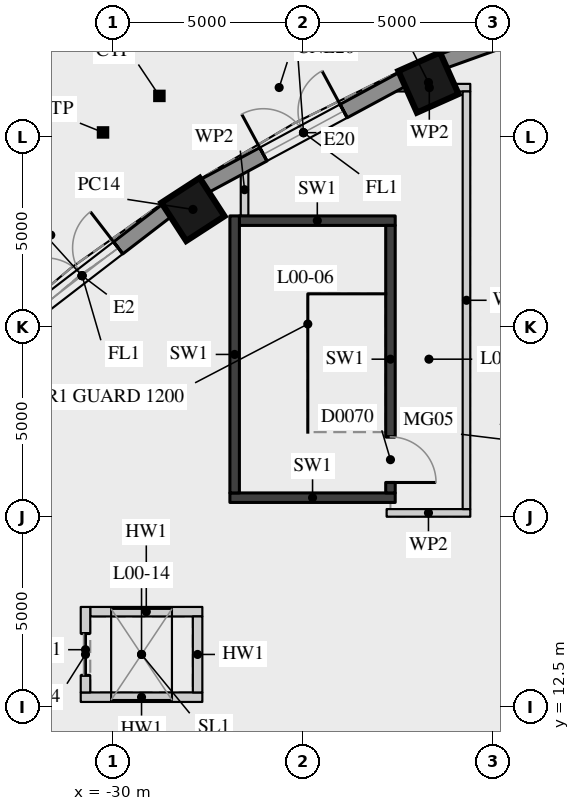
"""IFC4 building model, lengths in metres.
Left out: names, types, materials, properties, quantities, classifications, styles, units other than length and angle.
Written with IfcOpenShell. Run it as: python <this file> out.ifc"""

import sys

from ifc_helpers import new_model, si_unit, direction, frame, frame_2d, origin, origin_2d, place, context, subcontext, project, spatial, rectangle, hollow_circle, extrude, element, fill, save


model = new_model("IFC4")
c1 = context("Model", 3, precision=1e-05, world=origin(), true_north=direction((0.0, 1.0)))
c2 = subcontext(c1, "Body", "Model", "MODEL_VIEW")
j1 = project(units=[si_unit("LENGTHUNIT", "METRE"), si_unit("PLANEANGLEUNIT", "RADIAN")], contexts=[c1])
p1 = place(None, origin())
s1 = spatial("IfcSite", under=j1, at=p1, CompositionType="ELEMENT")
p2 = place(p1, origin())
s2 = spatial("IfcBuilding", under=s1, at=p2, CompositionType="ELEMENT")
p3 = place(p2, origin())
s3 = spatial("IfcBuildingStorey", under=s2, at=p3, CompositionType="ELEMENT", Elevation=0.0)
for number, where, z_axis, x_axis in (
    (1, (-21.7, 28.925, 0.0), (0.0, 0.0, 1.0), (-0.407, 0.913, 0.0)),
    (2, (-27.897, 25.586, 0.0), (0.0, 0.0, 1.0), (-0.544, 0.839, 0.0)),
):
    element("IfcColumn", number, at=place(p3, frame(where, z_axis=z_axis, x_axis=x_axis)), inside=s3, PredefinedType="COLUMN", context=c2, shape_type="SweptSolid", body=[
        extrude(rectangle(XDim=1.2, YDim=1.2, at=origin_2d()), origin(), (0.0, 0.0, 1.0), 7.5),
    ])
p4 = place(p3, frame((-15.49, 31.577, 0.0), z_axis=(0.0, 0.0, 1.0), x_axis=(-0.941225814421, -0.337777983694, 0.0)))
e3 = element("IfcWall", 3, at=p4, inside=s3, PredefinedType="SOLIDWALL", context=c2, shape_type="SweptSolid", body=[
    extrude(rectangle(XDim=6.199, YDim=0.4, at=frame_2d((3.1, 0.0))), origin(), (0.0, 0.0, 1.0), 6.19),
])
p5 = place(p4, frame((1.9, 0.0, 0.0)))
e4 = element("IfcOpeningElement", 4, at=p5, cuts=e3, PredefinedType="OPENING", context=c2, shape_type="SweptSolid", body=[
    extrude(rectangle(XDim=2.4, YDim=2.2, at=frame_2d((1.2, 1.1))), frame((0.0, 0.21, 0.0), z_axis=(0.0, -1.0, 0.0), x_axis=(1.0, 0.0, 0.0)), (0.0, 0.0, 1.0), 0.42),
])
p6 = place(p4, frame((1.9, 0.0, 2.6)))
e5 = element("IfcOpeningElement", 5, at=p6, cuts=e3, PredefinedType="OPENING", context=c2, shape_type="SweptSolid", body=[
    extrude(rectangle(XDim=2.4, YDim=3.49, at=frame_2d((1.2, 1.745))), frame((0.0, 0.21, 0.0), z_axis=(0.0, -1.0, 0.0), x_axis=(1.0, 0.0, 0.0)), (0.0, 0.0, 1.0), 0.42),
])
p7 = place(p3, frame((-22.366, 29.019, 0.0), z_axis=(0.0, 0.0, 1.0), x_axis=(-0.880313157301, -0.474393028072, 0.0)))
e6 = element("IfcWall", 6, at=p7, inside=s3, PredefinedType="SOLIDWALL", context=c2, shape_type="SweptSolid", body=[
    extrude(rectangle(XDim=5.958, YDim=0.4, at=frame_2d((2.979, 0.0))), origin(), (0.0, 0.0, 1.0), 6.19),
])
p8 = place(p7, frame((1.779, 0.0, 0.0)))
e7 = element("IfcOpeningElement", 7, at=p8, cuts=e6, PredefinedType="OPENING", context=c2, shape_type="SweptSolid", body=[
    extrude(rectangle(XDim=2.4, YDim=2.2, at=frame_2d((1.2, 1.1))), frame((0.0, 0.21, 0.0), z_axis=(0.0, -1.0, 0.0), x_axis=(1.0, 0.0, 0.0)), (0.0, 0.0, 1.0), 0.42),
])
p9 = place(p7, frame((1.779, 0.0, 2.6)))
e8 = element("IfcOpeningElement", 8, at=p9, cuts=e6, PredefinedType="OPENING", context=c2, shape_type="SweptSolid", body=[
    extrude(rectangle(XDim=2.4, YDim=3.49, at=frame_2d((1.2, 1.745))), frame((0.0, 0.21, 0.0), z_axis=(0.0, -1.0, 0.0), x_axis=(1.0, 0.0, 0.0)), (0.0, 0.0, 1.0), 0.42),
])
p10 = place(p3, frame((-28.781, 28.573, -0.2), z_axis=(0.0, 0.0, 1.0), x_axis=(1.0, 0.0, 0.0)))
e9 = element("IfcColumn", 9, at=p10, inside=s3, PredefinedType="COLUMN", context=c2, shape_type="SweptSolid", body=[
    extrude(hollow_circle(Radius=0.084, WallThickness=0.008, at=origin_2d()), origin(), (0.0, 0.0, 1.0), 4.755),
])
p11 = place(p3, frame((-28.567, 25.572, 0.0), z_axis=(0.0, 0.0, 1.0), x_axis=(-0.79246558555, -0.609916630138, 0.0)))
e10 = element("IfcWall", 10, at=p11, inside=s3, PredefinedType="SOLIDWALL", context=c2, shape_type="SweptSolid", body=[
    extrude(rectangle(XDim=5.673, YDim=0.4, at=frame_2d((2.837, 0.0))), origin(), (0.0, 0.0, 1.0), 6.19),
])
p12 = place(p11, frame((1.637, 0.0, 0.0)))
e11 = element("IfcOpeningElement", 11, at=p12, cuts=e10, PredefinedType="OPENING", context=c2, shape_type="SweptSolid", body=[
    extrude(rectangle(XDim=2.4, YDim=2.2, at=frame_2d((1.2, 1.1))), frame((0.0, 0.21, 0.0), z_axis=(0.0, -1.0, 0.0), x_axis=(1.0, 0.0, 0.0)), (0.0, 0.0, 1.0), 0.42),
])
p13 = place(p11, frame((1.637, 0.0, 2.6)))
e12 = element("IfcOpeningElement", 12, at=p13, cuts=e10, PredefinedType="OPENING", context=c2, shape_type="SweptSolid", body=[
    extrude(rectangle(XDim=2.4, YDim=3.49, at=frame_2d((1.2, 1.745))), frame((0.0, 0.21, 0.0), z_axis=(0.0, -1.0, 0.0), x_axis=(1.0, 0.0, 0.0)), (0.0, 0.0, 1.0), 0.42),
])
p14 = place(p3, frame((-30.264, 27.612, -0.2), z_axis=(0.0, 0.0, 1.0), x_axis=(1.0, 0.0, 0.0)))
e13 = element("IfcColumn", 13, at=p14, inside=s3, PredefinedType="COLUMN", context=c2, shape_type="SweptSolid", body=[
    extrude(hollow_circle(Radius=0.084, WallThickness=0.008, at=origin_2d()), origin(), (0.0, 0.0, 1.0), 4.755),
])
p15 = place(p3, frame((-30.85, 12.75, 0.0), z_axis=(0.0, 0.0, 1.0), x_axis=(1.0, 0.0, 0.0)))
e14 = element("IfcWall", 14, at=p15, inside=s3, PredefinedType="SHEAR", context=c2, shape_type="SweptSolid", body=[
    extrude(rectangle(XDim=3.2, YDim=0.25, at=frame_2d((1.6, 0.0))), origin(), (0.0, 0.0, 1.0), 7.09),
])
p16 = place(p3, frame((-30.6, 15.0, 0.0), z_axis=(0.0, 0.0, 1.0), x_axis=(1.0, 0.0, 0.0)))
e15 = element("IfcWall", 15, at=p16, inside=s3, PredefinedType="SHEAR", context=c2, shape_type="SweptSolid", body=[
    extrude(rectangle(XDim=2.95, YDim=0.25, at=frame_2d((1.475, 0.0))), origin(), (0.0, 0.0, 1.0), 7.09),
])
p17 = place(p3, frame((-22.8, 17.6, 0.0), z_axis=(0.0, 0.0, 1.0), x_axis=(1.0, 0.0, 0.0)))
e16 = element("IfcWall", 16, at=p17, inside=s3, PredefinedType="PARTITIONING", context=c2, shape_type="SweptSolid", body=[
    extrude(rectangle(XDim=2.2, YDim=0.2, at=frame_2d((1.1, 0.0))), origin(), (0.0, 0.0, 1.0), 7.09),
])
p18 = place(p3, frame((-26.925, 18.0, 0.0), z_axis=(0.0, 0.0, 1.0), x_axis=(1.0, 0.0, 0.0)))
e17 = element("IfcWall", 17, at=p18, inside=s3, PredefinedType="SOLIDWALL", context=c2, shape_type="SweptSolid", body=[
    extrude(rectangle(XDim=4.35, YDim=0.25, at=frame_2d((2.175, 0.0))), origin(), (0.0, 0.0, 1.0), 7.09),
])
p19 = place(p3, frame((-26.675, 25.29, 0.0), z_axis=(0.0, 0.0, 1.0), x_axis=(1.0, 0.0, 0.0)))
e18 = element("IfcWall", 18, at=p19, inside=s3, PredefinedType="SOLIDWALL", context=c2, shape_type="SweptSolid", body=[
    extrude(rectangle(XDim=4.1, YDim=0.25, at=frame_2d((2.05, 0.0))), origin(), (0.0, 0.0, 1.0), 7.09),
])
p20 = place(p3, frame((-22.755, 28.79, 0.0), z_axis=(0.0, 0.0, 1.0), x_axis=(1.0, 0.0, 0.0)))
e19 = element("IfcWall", 19, at=p20, inside=s3, PredefinedType="PARTITIONING", context=c2, shape_type="SweptSolid", body=[
    extrude(rectangle(XDim=2.155, YDim=0.2, at=frame_2d((1.078, 0.0))), origin(), (0.0, 0.0, 1.0), 7.09),
])
p21 = place(p3, frame((-30.725, 12.875, 0.0), z_axis=(0.0, 0.0, 1.0), x_axis=(0.0, 1.0, 0.0)))
e20 = element("IfcWall", 20, at=p21, inside=s3, PredefinedType="SHEAR", context=c2, shape_type="SweptSolid", body=[
    extrude(rectangle(XDim=2.25, YDim=0.25, at=frame_2d((1.125, 0.0))), origin(), (0.0, 0.0, 1.0), 7.09),
])
p22 = place(p21, frame((0.45, 0.0, 0.0)))
e21 = element("IfcOpeningElement", 21, at=p22, cuts=e20, PredefinedType="OPENING", context=c2, shape_type="SweptSolid", body=[
    extrude(rectangle(XDim=1.1, YDim=2.1, at=frame_2d((0.55, 1.05))), frame((0.0, 0.135, 0.0), z_axis=(0.0, -1.0, 0.0), x_axis=(1.0, 0.0, 0.0)), (0.0, 0.0, 1.0), 0.27),
])
p23 = place(p3, frame((-27.775, 12.875, 0.0), z_axis=(0.0, 0.0, 1.0), x_axis=(0.0, 1.0, 0.0)))
e22 = element("IfcWall", 22, at=p23, inside=s3, PredefinedType="SHEAR", context=c2, shape_type="SweptSolid", body=[
    extrude(rectangle(XDim=2.0, YDim=0.25, at=frame_2d((1.0, 0.0))), origin(), (0.0, 0.0, 1.0), 7.09),
])
p24 = place(p3, frame((-26.8, 18.125, 0.0), z_axis=(0.0, 0.0, 1.0), x_axis=(0.0, 1.0, 0.0)))
e23 = element("IfcWall", 23, at=p24, inside=s3, PredefinedType="SOLIDWALL", context=c2, shape_type="SweptSolid", body=[
    extrude(rectangle(XDim=7.29, YDim=0.25, at=frame_2d((3.645, 0.0))), origin(), (0.0, 0.0, 1.0), 7.09),
])
p25 = place(p3, frame((-26.539, 25.415, 0.0), z_axis=(0.0, 0.0, 1.0), x_axis=(0.0, 1.0, 0.0)))
e24 = element("IfcWall", 24, at=p25, inside=s3, PredefinedType="PARTITIONING", context=c2, shape_type="SweptSolid", body=[
    extrude(rectangle(XDim=1.381, YDim=0.2, at=frame_2d((0.69, 0.0))), origin(), (0.0, 0.0, 1.0), 7.09),
])
p26 = place(p3, frame((-22.7, 18.125, 0.0), z_axis=(0.0, 0.0, 1.0), x_axis=(0.0, 1.0, 0.0)))
e25 = element("IfcWall", 25, at=p26, inside=s3, PredefinedType="SOLIDWALL", context=c2, shape_type="SweptSolid", body=[
    extrude(rectangle(XDim=7.04, YDim=0.25, at=frame_2d((3.52, 0.0))), origin(), (0.0, 0.0, 1.0), 7.09),
])
p27 = place(p26, frame((0.275, 0.0, 0.0)))
e26 = element("IfcOpeningElement", 26, at=p27, cuts=e25, PredefinedType="OPENING", context=c2, shape_type="SweptSolid", body=[
    extrude(rectangle(XDim=1.2, YDim=2.1, at=frame_2d((0.6, 1.05))), frame((0.0, 0.135, 0.0), z_axis=(0.0, -1.0, 0.0), x_axis=(1.0, 0.0, 0.0)), (0.0, 0.0, 1.0), 0.27),
])
p28 = place(p3, frame((-20.7, 17.7, 0.0), z_axis=(0.0, 0.0, 1.0), x_axis=(0.0, 1.0, 0.0)))
e27 = element("IfcWall", 27, at=p28, inside=s3, PredefinedType="PARTITIONING", context=c2, shape_type="SweptSolid", body=[
    extrude(rectangle(XDim=10.99, YDim=0.2, at=frame_2d((5.495, 0.0))), origin(), (0.0, 0.0, 1.0), 7.09),
])
p29 = place(p8, frame((2.4, 0.0, 0.0), z_axis=(0.0, 0.0, 1.0), x_axis=(-1.0, 0.0, 0.0)))
e28 = element("IfcDoor", 28, at=p29, inside=s3, OperationType="DOUBLE_DOOR_SINGLE_SWING", PredefinedType="DOOR", context=c2, shape_type="SweptSolid", body=[
    extrude(rectangle(XDim=2.4, YDim=2.2, at=frame_2d((1.2, 1.1))), frame((0.0, 0.05, 0.0), z_axis=(0.0, -1.0, 0.0), x_axis=(1.0, 0.0, 0.0)), (0.0, 0.0, 1.0), 0.05),
])
fill(e7, e28)
p30 = place(p9, origin())
e29 = element("IfcWindow", 29, at=p30, inside=s3, PartitioningType="SINGLE_PANEL", PredefinedType="WINDOW", context=c2, shape_type="SweptSolid", body=[
    extrude(rectangle(XDim=2.4, YDim=3.49, at=frame_2d((1.2, 1.745))), frame((0.0, 0.01, 0.0), z_axis=(0.0, -1.0, 0.0), x_axis=(1.0, 0.0, 0.0)), (0.0, 0.0, 1.0), 0.06),
])
fill(e8, e29)
p31 = place(p12, frame((2.4, 0.0, 0.0), z_axis=(0.0, 0.0, 1.0), x_axis=(-1.0, 0.0, 0.0)))
e30 = element("IfcDoor", 30, at=p31, inside=s3, OperationType="DOUBLE_DOOR_SINGLE_SWING", PredefinedType="DOOR", context=c2, shape_type="SweptSolid", body=[
    extrude(rectangle(XDim=2.4, YDim=2.2, at=frame_2d((1.2, 1.1))), frame((0.0, 0.05, 0.0), z_axis=(0.0, -1.0, 0.0), x_axis=(1.0, 0.0, 0.0)), (0.0, 0.0, 1.0), 0.05),
])
fill(e11, e30)
p32 = place(p13, origin())
e31 = element("IfcWindow", 31, at=p32, inside=s3, PartitioningType="SINGLE_PANEL", PredefinedType="WINDOW", context=c2, shape_type="SweptSolid", body=[
    extrude(rectangle(XDim=2.4, YDim=3.49, at=frame_2d((1.2, 1.745))), frame((0.0, 0.01, 0.0), z_axis=(0.0, -1.0, 0.0), x_axis=(1.0, 0.0, 0.0)), (0.0, 0.0, 1.0), 0.06),
])
fill(e12, e31)
p33 = place(p22, origin())
e32 = element("IfcDoor", 32, at=p33, inside=s3, OperationType="SLIDING_TO_LEFT", PredefinedType="DOOR", context=c2, shape_type="SweptSolid", body=[
    extrude(rectangle(XDim=1.1, YDim=2.1, at=frame_2d((0.55, 1.05))), frame((0.0, 0.025, 0.0), z_axis=(0.0, -1.0, 0.0), x_axis=(1.0, 0.0, 0.0)), (0.0, 0.0, 1.0), 0.05),
])
fill(e21, e32)
p34 = place(p27, origin())
e33 = element("IfcDoor", 33, at=p34, inside=s3, OperationType="SINGLE_SWING_RIGHT", PredefinedType="DOOR", context=c2, shape_type="SweptSolid", body=[
    extrude(rectangle(XDim=1.2, YDim=2.1, at=frame_2d((0.6, 1.05))), frame((0.0, 0.025, 0.0), z_axis=(0.0, -1.0, 0.0), x_axis=(1.0, 0.0, 0.0)), (0.0, 0.0, 1.0), 0.05),
])
fill(e26, e33)
save(model, sys.argv[1])
